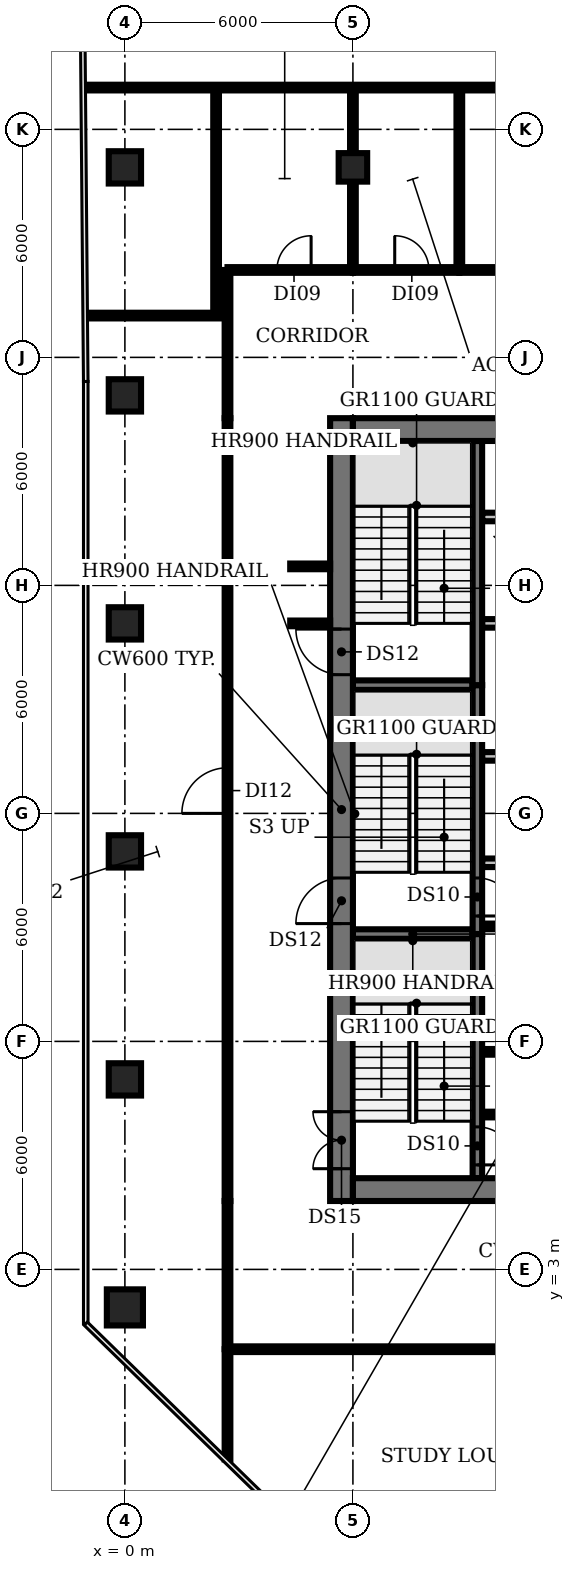
"""IFC4 building model, lengths in metres.
Left out: names, types, materials, properties, quantities, classifications, styles, units other than length and angle.
Written with IfcOpenShell. Run it as: python <this file> out.ifc"""

import sys

from ifc_helpers import new_model, si_unit, direction, frame, frame_2d, origin, origin_2d, place, context, subcontext, project, spatial, rectangle, circle, extrude, element, fill, save


model = new_model("IFC4")
c1 = context("Model", 3, precision=1e-05, world=origin(), true_north=direction((0.0, 1.0)))
c2 = subcontext(c1, "Body", "Model", "MODEL_VIEW")
j1 = project(units=[si_unit("LENGTHUNIT", "METRE"), si_unit("PLANEANGLEUNIT", "RADIAN")], contexts=[c1])
p1 = place(None, origin())
s1 = spatial("IfcSite", under=j1, at=p1, CompositionType="ELEMENT")
p2 = place(p1, origin())
s2 = spatial("IfcBuilding", under=s1, at=p2, CompositionType="ELEMENT")
p3 = place(p2, frame((0.0, 0.0, 171.8)))
s3 = spatial("IfcBuildingStorey", under=s2, at=p3, CompositionType="ELEMENT", Elevation=171.8)
p4 = place(p3, frame((0.0, 2.0, 0.0), z_axis=(0.0, 0.0, 1.0), x_axis=(1.0, 0.0, 0.0)))
e1 = element("IfcColumn", 1, at=p4, inside=s3, PredefinedType="COLUMN", context=c2, shape_type="SweptSolid", body=[
    extrude(circle(Radius=0.475, at=origin_2d()), origin(), (0.0, 0.0, 1.0), 3.85),
])
for number, where, z_axis, x_axis in (
    (2, (0.0, 8.0, 0.0), (0.0, 0.0, 1.0), (1.0, 0.0, 0.0)),
    (3, (0.0, 14.0, 0.0), (0.0, 0.0, 1.0), (1.0, 0.0, 0.0)),
    (4, (0.0, 20.0, 0.0), (0.0, 0.0, 1.0), (1.0, 0.0, 0.0)),
    (5, (0.0, 26.0, 0.0), (0.0, 0.0, 1.0), (1.0, 0.0, 0.0)),
    (6, (0.0, 32.0, 0.0), (0.0, 0.0, 1.0), (1.0, 0.0, 0.0)),
):
    element("IfcColumn", number, at=place(p3, frame(where, z_axis=z_axis, x_axis=x_axis)), inside=s3, PredefinedType="COLUMN", context=c2, shape_type="SweptSolid", body=[
        extrude(rectangle(XDim=0.85, YDim=0.85, at=origin_2d()), origin(), (0.0, 0.0, 1.0), 3.85),
    ])
p5 = place(p3, frame((6.0, 32.0, 0.0), z_axis=(0.0, 0.0, 1.0), x_axis=(1.0, 0.0, 0.0)))
e7 = element("IfcColumn", 7, at=p5, inside=s3, PredefinedType="COLUMN", context=c2, shape_type="SweptSolid", body=[
    extrude(rectangle(XDim=0.75, YDim=0.75, at=origin_2d()), origin(), (0.0, 0.0, 1.0), 3.85),
])
for number, where, z_axis, x_axis in (
    (8, (9.4, 7.075, 0.0), (0.0, 0.0, 1.0), (1.0, 0.0, 0.0)),
    (9, (9.4, 8.725, 0.0), (0.0, 0.0, 1.0), (1.0, 0.0, 0.0)),
    (10, (9.4, 10.375, 0.0), (0.0, 0.0, 1.0), (1.0, 0.0, 0.0)),
):
    element("IfcWall", number, at=place(p3, frame(where, z_axis=z_axis, x_axis=x_axis)), inside=s3, PredefinedType="SHEAR", context=c2, shape_type="SweptSolid", body=[
        extrude(rectangle(XDim=1.05, YDim=0.15, at=frame_2d((0.525, 0.0))), origin(), (0.0, 0.0, 1.0), 3.85),
    ])
p6 = place(p3, frame((6.0, 11.825, 0.0), z_axis=(0.0, 0.0, 1.0), x_axis=(1.0, 0.0, 0.0)))
e11 = element("IfcWall", 11, at=p6, inside=s3, PredefinedType="SHEAR", context=c2, shape_type="SweptSolid", body=[
    extrude(rectangle(XDim=3.15, YDim=0.25, at=frame_2d((1.575, 0.0))), origin(), (0.0, 0.0, 1.0), 3.85),
])
p7 = place(p3, frame((9.4, 12.025, 0.0), z_axis=(0.0, 0.0, 1.0), x_axis=(1.0, 0.0, 0.0)))
e12 = element("IfcWall", 12, at=p7, inside=s3, PredefinedType="SHEAR", context=c2, shape_type="SweptSolid", body=[
    extrude(rectangle(XDim=1.05, YDim=0.15, at=frame_2d((0.525, 0.0))), origin(), (0.0, 0.0, 1.0), 3.85),
])
p8 = place(p3, frame((9.4, 13.7, 0.0), z_axis=(0.0, 0.0, 1.0), x_axis=(1.0, 0.0, 0.0)))
e13 = element("IfcWall", 13, at=p8, inside=s3, PredefinedType="PARTITIONING", context=c2, shape_type="SweptSolid", body=[
    extrude(rectangle(XDim=4.0, YDim=0.225, at=frame_2d((2.0, 0.0))), origin(), (0.0, 0.0, 1.0), 3.85),
])
p9 = place(p3, frame((9.4, 16.5, 0.0), z_axis=(0.0, 0.0, 1.0), x_axis=(1.0, 0.0, 0.0)))
e14 = element("IfcWall", 14, at=p9, inside=s3, PredefinedType="PARTITIONING", context=c2, shape_type="SweptSolid", body=[
    extrude(rectangle(XDim=14.6, YDim=0.225, at=frame_2d((7.3, 0.0))), origin(), (0.0, 0.0, 1.0), 3.85),
])
p10 = place(p9, frame((0.55, 0.0, 0.0)))
e15 = element("IfcOpeningElement", 15, at=p10, cuts=e14, PredefinedType="OPENING", context=c2, shape_type="SweptSolid", body=[
    extrude(rectangle(XDim=0.9, YDim=2.1, at=frame_2d((0.45, 1.05))), frame((0.0, 0.123, 0.0), z_axis=(0.0, -1.0, 0.0), x_axis=(1.0, 0.0, 0.0)), (0.0, 0.0, 1.0), 0.245),
])
p11 = place(p9, frame((6.075, 0.0, 0.0)))
e16 = element("IfcOpeningElement", 16, at=p11, cuts=e14, PredefinedType="OPENING", context=c2, shape_type="SweptSolid", body=[
    extrude(rectangle(XDim=1.0, YDim=2.1, at=frame_2d((0.5, 1.05))), frame((0.0, 0.123, 0.0), z_axis=(0.0, -1.0, 0.0), x_axis=(1.0, 0.0, 0.0)), (0.0, 0.0, 1.0), 0.245),
])
p12 = place(p9, frame((11.308, 0.0, 0.0)))
e17 = element("IfcOpeningElement", 17, at=p12, cuts=e14, PredefinedType="OPENING", context=c2, shape_type="SweptSolid", body=[
    extrude(rectangle(XDim=0.9, YDim=2.1, at=frame_2d((0.45, 1.05))), frame((0.0, 0.123, 0.0), z_axis=(0.0, -1.0, 0.0), x_axis=(1.0, 0.0, 0.0)), (0.0, 0.0, 1.0), 0.245),
])
p13 = place(p9, frame((13.083, 0.0, 0.0)))
e18 = element("IfcOpeningElement", 18, at=p13, cuts=e14, PredefinedType="OPENING", context=c2, shape_type="SweptSolid", body=[
    extrude(rectangle(XDim=0.9, YDim=2.1, at=frame_2d((0.45, 1.05))), frame((0.0, 0.123, 0.0), z_axis=(0.0, -1.0, 0.0), x_axis=(1.0, 0.0, 0.0)), (0.0, 0.0, 1.0), 0.245),
])
p14 = place(p3, frame((6.0, 18.375, 0.0), z_axis=(0.0, 0.0, 1.0), x_axis=(1.0, 0.0, 0.0)))
e19 = element("IfcWall", 19, at=p14, inside=s3, PredefinedType="SHEAR", context=c2, shape_type="SweptSolid", body=[
    extrude(rectangle(XDim=3.15, YDim=0.25, at=frame_2d((1.575, 0.0))), origin(), (0.0, 0.0, 1.0), 3.85),
])
p15 = place(p3, frame((24.0, 20.0, 0.0), z_axis=(0.0, 0.0, 1.0), x_axis=(-1.0, 0.0, 0.0)))
e20 = element("IfcWall", 20, at=p15, inside=s3, PredefinedType="PARTITIONING", context=c2, shape_type="SweptSolid", body=[
    extrude(rectangle(XDim=14.6, YDim=0.225, at=frame_2d((7.3, 0.0))), origin(), (0.0, 0.0, 1.0), 3.85),
])
p16 = place(p15, frame((12.75, 0.0, 0.0)))
e21 = element("IfcOpeningElement", 21, at=p16, cuts=e20, PredefinedType="OPENING", context=c2, shape_type="SweptSolid", body=[
    extrude(rectangle(XDim=1.1, YDim=2.1, at=frame_2d((0.55, 1.05))), frame((0.0, 0.123, 0.0), z_axis=(0.0, -1.0, 0.0), x_axis=(1.0, 0.0, 0.0)), (0.0, 0.0, 1.0), 0.245),
])
p17 = place(p15, frame((9.95, 0.0, 0.0)))
e22 = element("IfcOpeningElement", 22, at=p17, cuts=e20, PredefinedType="OPENING", context=c2, shape_type="SweptSolid", body=[
    extrude(rectangle(XDim=1.1, YDim=2.1, at=frame_2d((0.55, 1.05))), frame((0.0, 0.123, 0.0), z_axis=(0.0, -1.0, 0.0), x_axis=(1.0, 0.0, 0.0)), (0.0, 0.0, 1.0), 0.245),
])
p18 = place(p15, frame((7.15, 0.0, 0.0)))
e23 = element("IfcOpeningElement", 23, at=p18, cuts=e20, PredefinedType="OPENING", context=c2, shape_type="SweptSolid", body=[
    extrude(rectangle(XDim=1.1, YDim=2.1, at=frame_2d((0.55, 1.05))), frame((0.0, 0.123, 0.0), z_axis=(0.0, -1.0, 0.0), x_axis=(1.0, 0.0, 0.0)), (0.0, 0.0, 1.0), 0.245),
])
p19 = place(p15, frame((4.35, 0.0, 0.0)))
e24 = element("IfcOpeningElement", 24, at=p19, cuts=e20, PredefinedType="OPENING", context=c2, shape_type="SweptSolid", body=[
    extrude(rectangle(XDim=1.1, YDim=2.1, at=frame_2d((0.55, 1.05))), frame((0.0, 0.123, 0.0), z_axis=(0.0, -1.0, 0.0), x_axis=(1.0, 0.0, 0.0)), (0.0, 0.0, 1.0), 0.245),
])
p20 = place(p15, frame((2.308, 0.0, 0.0)))
e25 = element("IfcOpeningElement", 25, at=p20, cuts=e20, PredefinedType="OPENING", context=c2, shape_type="SweptSolid", body=[
    extrude(rectangle(XDim=0.9, YDim=2.1, at=frame_2d((0.45, 1.05))), frame((0.0, 0.123, 0.0), z_axis=(0.0, -1.0, 0.0), x_axis=(1.0, 0.0, 0.0)), (0.0, 0.0, 1.0), 0.245),
])
p21 = place(p15, frame((0.532, 0.0, 0.0)))
e26 = element("IfcOpeningElement", 26, at=p21, cuts=e20, PredefinedType="OPENING", context=c2, shape_type="SweptSolid", body=[
    extrude(rectangle(XDim=0.9, YDim=2.1, at=frame_2d((0.45, 1.05))), frame((0.0, 0.123, 0.0), z_axis=(0.0, -1.0, 0.0), x_axis=(1.0, 0.0, 0.0)), (0.0, 0.0, 1.0), 0.245),
])
p22 = place(p3, frame((9.4, 22.8, 0.0), z_axis=(0.0, 0.0, 1.0), x_axis=(1.0, 0.0, 0.0)))
e27 = element("IfcWall", 27, at=p22, inside=s3, PredefinedType="PARTITIONING", context=c2, shape_type="SweptSolid", body=[
    extrude(rectangle(XDim=14.6, YDim=0.225, at=frame_2d((7.3, 0.0))), origin(), (0.0, 0.0, 1.0), 3.85),
])
p23 = place(p3, frame((9.275, 11.825, 0.0), z_axis=(0.0, 0.0, 1.0), x_axis=(0.0, -1.0, 0.0)))
e28 = element("IfcWall", 28, at=p23, inside=s3, PredefinedType="SHEAR", context=c2, shape_type="SweptSolid", body=[
    extrude(rectangle(XDim=6.425, YDim=0.25, at=frame_2d((3.212, 0.0))), origin(), (0.0, 0.0, 1.0), 3.85),
])
p24 = place(p23, frame((5.075, 0.0, 0.0)))
e29 = element("IfcOpeningElement", 29, at=p24, cuts=e28, PredefinedType="OPENING", context=c2, shape_type="SweptSolid", body=[
    extrude(rectangle(XDim=1.0, YDim=2.1, at=frame_2d((0.5, 1.05))), frame((0.0, 0.135, 0.0), z_axis=(0.0, -1.0, 0.0), x_axis=(1.0, 0.0, 0.0)), (0.0, 0.0, 1.0), 0.27),
])
p25 = place(p3, frame((9.275, 18.375, 0.0), z_axis=(0.0, 0.0, 1.0), x_axis=(0.0, -1.0, 0.0)))
e30 = element("IfcWall", 30, at=p25, inside=s3, PredefinedType="SHEAR", context=c2, shape_type="SweptSolid", body=[
    extrude(rectangle(XDim=6.55, YDim=0.25, at=frame_2d((3.275, 0.0))), origin(), (0.0, 0.0, 1.0), 3.85),
])
p26 = place(p25, frame((5.075, 0.0, 0.0)))
e31 = element("IfcOpeningElement", 31, at=p26, cuts=e30, PredefinedType="OPENING", context=c2, shape_type="SweptSolid", body=[
    extrude(rectangle(XDim=1.0, YDim=2.1, at=frame_2d((0.5, 1.05))), frame((0.0, 0.135, 0.0), z_axis=(0.0, -1.0, 0.0), x_axis=(1.0, 0.0, 0.0)), (0.0, 0.0, 1.0), 0.27),
])
p27 = place(p3, frame((9.275, 18.375, 0.0), z_axis=(0.0, 0.0, 1.0), x_axis=(0.0, 1.0, 0.0)))
e32 = element("IfcWall", 32, at=p27, inside=s3, PredefinedType="SHEAR", context=c2, shape_type="SweptSolid", body=[
    extrude(rectangle(XDim=6.425, YDim=0.25, at=frame_2d((3.212, 0.0))), origin(), (0.0, 0.0, 1.0), 3.85),
])
p28 = place(p3, frame((5.7, 4.8, 0.0), z_axis=(0.0, 0.0, 1.0), x_axis=(0.0, 1.0, 0.0)))
e33 = element("IfcWall", 33, at=p28, inside=s3, PredefinedType="SHEAR", context=c2, shape_type="SweptSolid", body=[
    extrude(rectangle(XDim=20.6, YDim=0.6, at=frame_2d((10.3, 0.0))), origin(), (0.0, 0.0, 1.0), 3.85),
])
p29 = place(p28, frame((0.85, 0.0, 0.0)))
e34 = element("IfcOpeningElement", 34, at=p29, cuts=e33, PredefinedType="OPENING", context=c2, shape_type="SweptSolid", body=[
    extrude(rectangle(XDim=1.5, YDim=2.1, at=frame_2d((0.75, 1.05))), frame((0.0, 0.31, 0.0), z_axis=(0.0, -1.0, 0.0), x_axis=(1.0, 0.0, 0.0)), (0.0, 0.0, 1.0), 0.62),
])
p30 = place(p28, frame((7.3, 0.0, 0.0)))
e35 = element("IfcOpeningElement", 35, at=p30, cuts=e33, PredefinedType="OPENING", context=c2, shape_type="SweptSolid", body=[
    extrude(rectangle(XDim=1.2, YDim=2.1, at=frame_2d((0.6, 1.05))), frame((0.0, 0.31, 0.0), z_axis=(0.0, -1.0, 0.0), x_axis=(1.0, 0.0, 0.0)), (0.0, 0.0, 1.0), 0.62),
])
p31 = place(p28, frame((13.85, 0.0, 0.0)))
e36 = element("IfcOpeningElement", 36, at=p31, cuts=e33, PredefinedType="OPENING", context=c2, shape_type="SweptSolid", body=[
    extrude(rectangle(XDim=1.2, YDim=2.1, at=frame_2d((0.6, 1.05))), frame((0.0, 0.31, 0.0), z_axis=(0.0, -1.0, 0.0), x_axis=(1.0, 0.0, 0.0)), (0.0, 0.0, 1.0), 0.62),
])
p32 = place(p3, frame((24.0, 5.1, 0.0), z_axis=(0.0, 0.0, 1.0), x_axis=(-1.0, 0.0, 0.0)))
e37 = element("IfcWall", 37, at=p32, inside=s3, PredefinedType="SHEAR", context=c2, shape_type="SweptSolid", body=[
    extrude(rectangle(XDim=18.0, YDim=0.6, at=frame_2d((9.0, 0.0))), origin(), (0.0, 0.0, 1.0), 3.85),
])
p33 = place(p32, frame((13.0, 0.0, 0.0)))
e38 = element("IfcOpeningElement", 38, at=p33, cuts=e37, PredefinedType="OPENING", context=c2, shape_type="SweptSolid", body=[
    extrude(rectangle(XDim=1.2, YDim=2.1, at=frame_2d((0.6, 1.05))), frame((0.0, 0.31, 0.0), z_axis=(0.0, -1.0, 0.0), x_axis=(1.0, 0.0, 0.0)), (0.0, 0.0, 1.0), 0.62),
])
p34 = place(p32, frame((4.9, 0.0, 0.0)))
e39 = element("IfcOpeningElement", 39, at=p34, cuts=e37, PredefinedType="OPENING", context=c2, shape_type="SweptSolid", body=[
    extrude(rectangle(XDim=1.0, YDim=2.1, at=frame_2d((0.5, 1.05))), frame((0.0, 0.31, 0.0), z_axis=(0.0, -1.0, 0.0), x_axis=(1.0, 0.0, 0.0)), (0.0, 0.0, 1.0), 0.62),
])
p35 = place(p3, frame((6.0, 25.1, 0.0), z_axis=(0.0, 0.0, 1.0), x_axis=(1.0, 0.0, 0.0)))
e40 = element("IfcWall", 40, at=p35, inside=s3, PredefinedType="SHEAR", context=c2, shape_type="SweptSolid", body=[
    extrude(rectangle(XDim=18.0, YDim=0.6, at=frame_2d((9.0, 0.0))), origin(), (0.0, 0.0, 1.0), 3.85),
])
p36 = place(p3, frame((-1.05, 34.1, 0.0), z_axis=(0.0, 0.0, 1.0), x_axis=(1.0, 0.0, 0.0)))
e41 = element("IfcWall", 41, at=p36, inside=s3, PredefinedType="PARTITIONING", context=c2, shape_type="SweptSolid", body=[
    extrude(rectangle(XDim=14.7, YDim=0.15, at=frame_2d((7.35, 0.0))), origin(), (0.0, 0.0, 1.0), 2.88),
])
p37 = place(p3, frame((-1.0, 28.1, 0.0), z_axis=(0.0, 0.0, 1.0), x_axis=(1.0, 0.0, 0.0)))
e42 = element("IfcWall", 42, at=p37, inside=s3, PredefinedType="PARTITIONING", context=c2, shape_type="SweptSolid", body=[
    extrude(rectangle(XDim=3.7, YDim=0.15, at=frame_2d((1.85, 0.0))), origin(), (0.0, 0.0, 1.0), 2.88),
])
p38 = place(p3, frame((2.4, 28.1, 0.0), z_axis=(0.0, 0.0, 1.0), x_axis=(0.0, 1.0, 0.0)))
e43 = element("IfcWall", 43, at=p38, inside=s3, PredefinedType="PARTITIONING", context=c2, shape_type="SweptSolid", body=[
    extrude(rectangle(XDim=6.0, YDim=0.15, at=frame_2d((3.0, 0.0))), origin(), (0.0, 0.0, 1.0), 2.88),
])
p39 = place(p3, frame((2.7, -2.0, 0.0), z_axis=(0.0, 0.0, 1.0), x_axis=(0.0, 1.0, 0.0)))
e44 = element("IfcWall", 44, at=p39, inside=s3, PredefinedType="PARTITIONING", context=c2, shape_type="SweptSolid", body=[
    extrude(rectangle(XDim=2.9, YDim=0.15, at=frame_2d((1.45, 0.0))), origin(), (0.0, 0.0, 1.0), 2.88),
])
p40 = place(p3, frame((2.7, 0.9, 0.0), z_axis=(0.0, 0.0, 1.0), x_axis=(0.0, 1.0, 0.0)))
e45 = element("IfcWall", 45, at=p40, inside=s3, PredefinedType="PARTITIONING", context=c2, shape_type="SweptSolid", body=[
    extrude(rectangle(XDim=3.9, YDim=0.15, at=frame_2d((1.95, 0.0))), origin(), (0.0, 0.0, 1.0), 2.88),
])
p41 = place(p3, frame((2.7, 4.8, 0.0), z_axis=(0.0, 0.0, 1.0), x_axis=(0.0, 1.0, 0.0)))
e46 = element("IfcWall", 46, at=p41, inside=s3, PredefinedType="PARTITIONING", context=c2, shape_type="SweptSolid", body=[
    extrude(rectangle(XDim=20.6, YDim=0.15, at=frame_2d((10.3, 0.0))), origin(), (0.0, 0.0, 1.0), 2.88),
])
p42 = place(p41, frame((10.2, 0.0, 0.0)))
e47 = element("IfcOpeningElement", 47, at=p42, cuts=e46, PredefinedType="OPENING", context=c2, shape_type="SweptSolid", body=[
    extrude(rectangle(XDim=1.2, YDim=2.1, at=frame_2d((0.6, 1.05))), frame((0.0, 0.085, 0.0), z_axis=(0.0, -1.0, 0.0), x_axis=(1.0, 0.0, 0.0)), (0.0, 0.0, 1.0), 0.17),
])
p43 = place(p3, frame((2.7, 25.4, 0.0), z_axis=(0.0, 0.0, 1.0), x_axis=(0.0, 1.0, 0.0)))
e48 = element("IfcWall", 48, at=p43, inside=s3, PredefinedType="PARTITIONING", context=c2, shape_type="SweptSolid", body=[
    extrude(rectangle(XDim=3.9, YDim=0.15, at=frame_2d((1.95, 0.0))), origin(), (0.0, 0.0, 1.0), 2.88),
])
p44 = place(p3, frame((2.7, 29.3, 0.0), z_axis=(0.0, 0.0, 1.0), x_axis=(1.0, 0.0, 0.0)))
e49 = element("IfcWall", 49, at=p44, inside=s3, PredefinedType="PARTITIONING", context=c2, shape_type="SweptSolid", body=[
    extrude(rectangle(XDim=3.3, YDim=0.15, at=frame_2d((1.65, 0.0))), origin(), (0.0, 0.0, 1.0), 2.88),
])
p45 = place(p44, frame((1.3, 0.0, 0.0)))
e50 = element("IfcOpeningElement", 50, at=p45, cuts=e49, PredefinedType="OPENING", context=c2, shape_type="SweptSolid", body=[
    extrude(rectangle(XDim=0.9, YDim=2.1, at=frame_2d((0.45, 1.05))), frame((0.0, 0.085, 0.0), z_axis=(0.0, -1.0, 0.0), x_axis=(1.0, 0.0, 0.0)), (0.0, 0.0, 1.0), 0.17),
])
for number, where, z_axis, x_axis in (
    (51, (4.35, 20.0, 0.0), (0.0, 0.0, 1.0), (1.0, 0.0, 0.0)),
    (52, (4.35, 21.5, 0.0), (0.0, 0.0, 1.0), (1.0, 0.0, 0.0)),
):
    element("IfcWall", number, at=place(p3, frame(where, z_axis=z_axis, x_axis=x_axis)), inside=s3, PredefinedType="PARTITIONING", context=c2, shape_type="SweptSolid", body=[
        extrude(rectangle(XDim=1.05, YDim=0.15, at=frame_2d((0.525, 0.0))), origin(), (0.0, 0.0, 1.0), 2.88),
    ])
p46 = place(p3, frame((6.0, 29.3, 0.0), z_axis=(0.0, 0.0, 1.0), x_axis=(0.0, 1.0, 0.0)))
e53 = element("IfcWall", 53, at=p46, inside=s3, PredefinedType="PARTITIONING", context=c2, shape_type="SweptSolid", body=[
    extrude(rectangle(XDim=4.8, YDim=0.15, at=frame_2d((2.4, 0.0))), origin(), (0.0, 0.0, 1.0), 2.88),
])
p47 = place(p3, frame((6.0, 29.3, 0.0), z_axis=(0.0, 0.0, 1.0), x_axis=(1.0, 0.0, 0.0)))
e54 = element("IfcWall", 54, at=p47, inside=s3, PredefinedType="PARTITIONING", context=c2, shape_type="SweptSolid", body=[
    extrude(rectangle(XDim=2.8, YDim=0.15, at=frame_2d((1.4, 0.0))), origin(), (0.0, 0.0, 1.0), 2.88),
])
p48 = place(p47, frame((1.1, 0.0, 0.0)))
e55 = element("IfcOpeningElement", 55, at=p48, cuts=e54, PredefinedType="OPENING", context=c2, shape_type="SweptSolid", body=[
    extrude(rectangle(XDim=0.9, YDim=2.1, at=frame_2d((0.45, 1.05))), frame((0.0, 0.085, 0.0), z_axis=(0.0, -1.0, 0.0), x_axis=(1.0, 0.0, 0.0)), (0.0, 0.0, 1.0), 0.17),
])
p49 = place(p3, frame((8.8, 29.3, 0.0), z_axis=(0.0, 0.0, 1.0), x_axis=(0.0, 1.0, 0.0)))
e56 = element("IfcWall", 56, at=p49, inside=s3, PredefinedType="PARTITIONING", context=c2, shape_type="SweptSolid", body=[
    extrude(rectangle(XDim=4.8, YDim=0.15, at=frame_2d((2.4, 0.0))), origin(), (0.0, 0.0, 1.0), 2.88),
])
p50 = place(p3, frame((8.8, 29.3, 0.0), z_axis=(0.0, 0.0, 1.0), x_axis=(1.0, 0.0, 0.0)))
e57 = element("IfcWall", 57, at=p50, inside=s3, PredefinedType="PARTITIONING", context=c2, shape_type="SweptSolid", body=[
    extrude(rectangle(XDim=4.85, YDim=0.15, at=frame_2d((2.425, 0.0))), origin(), (0.0, 0.0, 1.0), 2.88),
])
p51 = place(p3, frame((27.3, 0.9, 0.0), z_axis=(0.0, 0.0, 1.0), x_axis=(-1.0, 0.0, 0.0)))
e58 = element("IfcWall", 58, at=p51, inside=s3, PredefinedType="PARTITIONING", context=c2, shape_type="SweptSolid", body=[
    extrude(rectangle(XDim=24.6, YDim=0.15, at=frame_2d((12.3, 0.0))), origin(), (0.0, 0.0, 1.0), 2.88),
])
p52 = place(p51, frame((11.8, 0.0, 0.0)))
e59 = element("IfcOpeningElement", 59, at=p52, cuts=e58, PredefinedType="OPENING", context=c2, shape_type="SweptSolid", body=[
    extrude(rectangle(XDim=1.2, YDim=2.1, at=frame_2d((0.6, 1.05))), frame((0.0, 0.085, 0.0), z_axis=(0.0, -1.0, 0.0), x_axis=(1.0, 0.0, 0.0)), (0.0, 0.0, 1.0), 0.17),
])
p53 = place(p24, origin())
e60 = element("IfcDoor", 60, at=p53, inside=s3, OperationType="SINGLE_SWING_RIGHT", PredefinedType="DOOR", context=c2, shape_type="SweptSolid", body=[
    extrude(rectangle(XDim=1.0, YDim=2.1, at=frame_2d((0.5, 1.05))), frame((0.0, 0.025, 0.0), z_axis=(0.0, -1.0, 0.0), x_axis=(1.0, 0.0, 0.0)), (0.0, 0.0, 1.0), 0.05),
])
fill(e29, e60)
p54 = place(p26, origin())
e61 = element("IfcDoor", 61, at=p54, inside=s3, OperationType="SINGLE_SWING_RIGHT", PredefinedType="DOOR", context=c2, shape_type="SweptSolid", body=[
    extrude(rectangle(XDim=1.0, YDim=2.1, at=frame_2d((0.5, 1.05))), frame((0.0, 0.025, 0.0), z_axis=(0.0, -1.0, 0.0), x_axis=(1.0, 0.0, 0.0)), (0.0, 0.0, 1.0), 0.05),
])
fill(e31, e61)
p55 = place(p29, origin())
e62 = element("IfcDoor", 62, at=p55, inside=s3, OperationType="DOUBLE_DOOR_SINGLE_SWING", PredefinedType="DOOR", context=c2, shape_type="SweptSolid", body=[
    extrude(rectangle(XDim=1.5, YDim=2.1, at=frame_2d((0.75, 1.05))), frame((0.0, 0.025, 0.0), z_axis=(0.0, -1.0, 0.0), x_axis=(1.0, 0.0, 0.0)), (0.0, 0.0, 1.0), 0.05),
])
fill(e34, e62)
p56 = place(p30, origin())
e63 = element("IfcDoor", 63, at=p56, inside=s3, OperationType="SINGLE_SWING_LEFT", PredefinedType="DOOR", context=c2, shape_type="SweptSolid", body=[
    extrude(rectangle(XDim=1.2, YDim=2.1, at=frame_2d((0.6, 1.05))), frame((0.0, 0.025, 0.0), z_axis=(0.0, -1.0, 0.0), x_axis=(1.0, 0.0, 0.0)), (0.0, 0.0, 1.0), 0.05),
])
fill(e35, e63)
p57 = place(p31, origin())
e64 = element("IfcDoor", 64, at=p57, inside=s3, OperationType="SINGLE_SWING_RIGHT", PredefinedType="DOOR", context=c2, shape_type="SweptSolid", body=[
    extrude(rectangle(XDim=1.2, YDim=2.1, at=frame_2d((0.6, 1.05))), frame((0.0, 0.025, 0.0), z_axis=(0.0, -1.0, 0.0), x_axis=(1.0, 0.0, 0.0)), (0.0, 0.0, 1.0), 0.05),
])
fill(e36, e64)
p58 = place(p42, origin())
e65 = element("IfcDoor", 65, at=p58, inside=s3, OperationType="SINGLE_SWING_LEFT", PredefinedType="DOOR", context=c2, shape_type="SweptSolid", body=[
    extrude(rectangle(XDim=1.2, YDim=2.1, at=frame_2d((0.6, 1.05))), frame((0.0, 0.025, 0.0), z_axis=(0.0, -1.0, 0.0), x_axis=(1.0, 0.0, 0.0)), (0.0, 0.0, 1.0), 0.05),
])
fill(e47, e65)
p59 = place(p45, origin())
e66 = element("IfcDoor", 66, at=p59, inside=s3, OperationType="SINGLE_SWING_RIGHT", PredefinedType="DOOR", context=c2, shape_type="SweptSolid", body=[
    extrude(rectangle(XDim=0.9, YDim=2.1, at=frame_2d((0.45, 1.05))), frame((0.0, 0.025, 0.0), z_axis=(0.0, -1.0, 0.0), x_axis=(1.0, 0.0, 0.0)), (0.0, 0.0, 1.0), 0.05),
])
fill(e50, e66)
p60 = place(p48, origin())
e67 = element("IfcDoor", 67, at=p60, inside=s3, OperationType="SINGLE_SWING_LEFT", PredefinedType="DOOR", context=c2, shape_type="SweptSolid", body=[
    extrude(rectangle(XDim=0.9, YDim=2.1, at=frame_2d((0.45, 1.05))), frame((0.0, 0.025, 0.0), z_axis=(0.0, -1.0, 0.0), x_axis=(1.0, 0.0, 0.0)), (0.0, 0.0, 1.0), 0.05),
])
fill(e55, e67)
save(model, sys.argv[1])
